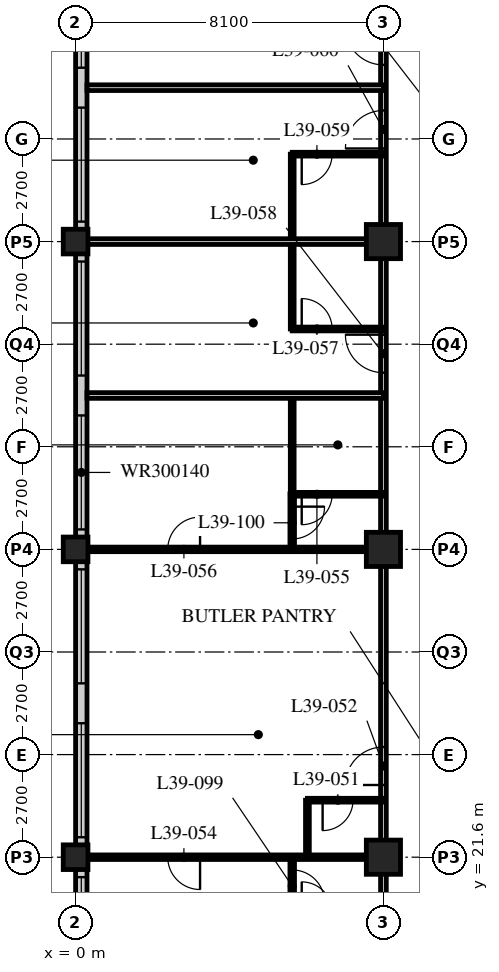
"""IFC4 building model, lengths in metres.
Left out: names, types, materials, properties, quantities, classifications, styles, units other than length and angle.
Written with IfcOpenShell. Run it as: python <this file> out.ifc"""

import sys

from ifc_helpers import new_model, si_unit, direction, frame, frame_2d, origin, origin_2d, place, context, subcontext, project, spatial, rectangle, hollow_rectangle, extrude, element, fill, save


model = new_model("IFC4")
c1 = context("Model", 3, precision=1e-05, world=origin(), true_north=direction((0.0, 1.0)))
c2 = subcontext(c1, "Body", "Model", "MODEL_VIEW")
j1 = project(units=[si_unit("LENGTHUNIT", "METRE"), si_unit("PLANEANGLEUNIT", "RADIAN")], contexts=[c1])
p1 = place(None, origin())
s1 = spatial("IfcSite", under=j1, at=p1, CompositionType="ELEMENT")
p2 = place(p1, origin())
s2 = spatial("IfcBuilding", under=s1, at=p2, CompositionType="ELEMENT")
p3 = place(p2, frame((0.0, 0.0, 151.0)))
s3 = spatial("IfcBuildingStorey", under=s2, at=p3, CompositionType="ELEMENT", Elevation=151.0)
for number, where, z_axis, x_axis in (
    (1, (0.0, 21.6, 0.0), (0.0, 0.0, 1.0), (1.0, 0.0, 0.0)),
    (2, (0.0, 29.7, 0.0), (0.0, 0.0, 1.0), (1.0, 0.0, 0.0)),
    (3, (0.0, 37.8, 0.0), (0.0, 0.0, 1.0), (1.0, 0.0, 0.0)),
):
    element("IfcColumn", number, at=place(p3, frame(where, z_axis=z_axis, x_axis=x_axis)), inside=s3, PredefinedType="COLUMN", context=c2, shape_type="SweptSolid", body=[
        extrude(hollow_rectangle(XDim=0.65, YDim=0.65, WallThickness=0.055, at=origin_2d()), origin(), (0.0, 0.0, 1.0), 3.4),
    ])
for number, where, z_axis, x_axis in (
    (4, (8.1, 21.6, 0.0), (0.0, 0.0, 1.0), (1.0, 0.0, 0.0)),
    (5, (8.1, 29.7, 0.0), (0.0, 0.0, 1.0), (1.0, 0.0, 0.0)),
    (6, (8.1, 37.8, 0.0), (0.0, 0.0, 1.0), (1.0, 0.0, 0.0)),
):
    element("IfcColumn", number, at=place(p3, frame(where, z_axis=z_axis, x_axis=x_axis)), inside=s3, PredefinedType="COLUMN", context=c2, shape_type="SweptSolid", body=[
        extrude(hollow_rectangle(XDim=0.9, YDim=0.9, WallThickness=0.1, at=origin_2d()), origin(), (0.0, 0.0, 1.0), 3.4),
    ])
p4 = place(p3, frame((0.15, 45.6, 0.0), z_axis=(0.0, 0.0, 1.0), x_axis=(0.0, -1.0, 0.0)))
e7 = element("IfcWall", 7, at=p4, inside=s3, PredefinedType="SOLIDWALL", context=c2, shape_type="SweptSolid", body=[
    extrude(rectangle(XDim=32.1, YDim=0.3, at=frame_2d((16.05, 0.0))), origin(), (0.0, 0.0, 1.0), 3.19),
])
p5 = place(p4, frame((0.225, 0.0, 0.9)))
e8 = element("IfcOpeningElement", 8, at=p5, cuts=e7, PredefinedType="OPENING", context=c2, shape_type="SweptSolid", body=[
    extrude(rectangle(XDim=3.0, YDim=1.4, at=frame_2d((1.5, 0.7))), frame((0.0, 0.16, 0.0), z_axis=(0.0, -1.0, 0.0), x_axis=(1.0, 0.0, 0.0)), (0.0, 0.0, 1.0), 0.32),
])
p6 = place(p4, frame((4.275, 0.0, 0.9)))
e9 = element("IfcOpeningElement", 9, at=p6, cuts=e7, PredefinedType="OPENING", context=c2, shape_type="SweptSolid", body=[
    extrude(rectangle(XDim=3.0, YDim=1.4, at=frame_2d((1.5, 0.7))), frame((0.0, 0.16, 0.0), z_axis=(0.0, -1.0, 0.0), x_axis=(1.0, 0.0, 0.0)), (0.0, 0.0, 1.0), 0.32),
])
p7 = place(p4, frame((8.325, 0.0, 0.9)))
e10 = element("IfcOpeningElement", 10, at=p7, cuts=e7, PredefinedType="OPENING", context=c2, shape_type="SweptSolid", body=[
    extrude(rectangle(XDim=3.0, YDim=1.4, at=frame_2d((1.5, 0.7))), frame((0.0, 0.16, 0.0), z_axis=(0.0, -1.0, 0.0), x_axis=(1.0, 0.0, 0.0)), (0.0, 0.0, 1.0), 0.32),
])
p8 = place(p4, frame((12.375, 0.0, 0.9)))
e11 = element("IfcOpeningElement", 11, at=p8, cuts=e7, PredefinedType="OPENING", context=c2, shape_type="SweptSolid", body=[
    extrude(rectangle(XDim=3.0, YDim=1.4, at=frame_2d((1.5, 0.7))), frame((0.0, 0.16, 0.0), z_axis=(0.0, -1.0, 0.0), x_axis=(1.0, 0.0, 0.0)), (0.0, 0.0, 1.0), 0.32),
])
p9 = place(p4, frame((16.425, 0.0, 0.9)))
e12 = element("IfcOpeningElement", 12, at=p9, cuts=e7, PredefinedType="OPENING", context=c2, shape_type="SweptSolid", body=[
    extrude(rectangle(XDim=3.0, YDim=1.4, at=frame_2d((1.5, 0.7))), frame((0.0, 0.16, 0.0), z_axis=(0.0, -1.0, 0.0), x_axis=(1.0, 0.0, 0.0)), (0.0, 0.0, 1.0), 0.32),
])
p10 = place(p4, frame((20.475, 0.0, 0.9)))
e13 = element("IfcOpeningElement", 13, at=p10, cuts=e7, PredefinedType="OPENING", context=c2, shape_type="SweptSolid", body=[
    extrude(rectangle(XDim=3.0, YDim=1.4, at=frame_2d((1.5, 0.7))), frame((0.0, 0.16, 0.0), z_axis=(0.0, -1.0, 0.0), x_axis=(1.0, 0.0, 0.0)), (0.0, 0.0, 1.0), 0.32),
])
p11 = place(p4, frame((24.525, 0.0, 0.9)))
e14 = element("IfcOpeningElement", 14, at=p11, cuts=e7, PredefinedType="OPENING", context=c2, shape_type="SweptSolid", body=[
    extrude(rectangle(XDim=3.0, YDim=1.4, at=frame_2d((1.5, 0.7))), frame((0.0, 0.16, 0.0), z_axis=(0.0, -1.0, 0.0), x_axis=(1.0, 0.0, 0.0)), (0.0, 0.0, 1.0), 0.32),
])
p12 = place(p4, frame((28.575, 0.0, 0.9)))
e15 = element("IfcOpeningElement", 15, at=p12, cuts=e7, PredefinedType="OPENING", context=c2, shape_type="SweptSolid", body=[
    extrude(rectangle(XDim=3.0, YDim=1.4, at=frame_2d((1.5, 0.7))), frame((0.0, 0.16, 0.0), z_axis=(0.0, -1.0, 0.0), x_axis=(1.0, 0.0, 0.0)), (0.0, 0.0, 1.0), 0.32),
])
p13 = place(p3, frame((8.1, 17.55, 0.0), z_axis=(0.0, 0.0, 1.0), x_axis=(0.0, 1.0, 0.0)))
e16 = element("IfcWall", 16, at=p13, inside=s3, PredefinedType="PARTITIONING", context=c2, shape_type="SweptSolid", body=[
    extrude(rectangle(XDim=28.35, YDim=0.15, at=frame_2d((14.175, 0.0))), origin(), (0.0, 0.0, 1.0), 2.42),
])
p14 = place(p13, frame((5.95, 0.0, 0.0)))
e17 = element("IfcOpeningElement", 17, at=p14, cuts=e16, PredefinedType="OPENING", context=c2, shape_type="SweptSolid", body=[
    extrude(rectangle(XDim=1.0, YDim=2.1, at=frame_2d((0.5, 1.05))), frame((0.0, 0.085, 0.0), z_axis=(0.0, -1.0, 0.0), x_axis=(1.0, 0.0, 0.0)), (0.0, 0.0, 1.0), 0.17),
])
p15 = place(p13, frame((16.8, 0.0, 0.0)))
e18 = element("IfcOpeningElement", 18, at=p15, cuts=e16, PredefinedType="OPENING", context=c2, shape_type="SweptSolid", body=[
    extrude(rectangle(XDim=1.0, YDim=2.1, at=frame_2d((0.5, 1.05))), frame((0.0, 0.085, 0.0), z_axis=(0.0, -1.0, 0.0), x_axis=(1.0, 0.0, 0.0)), (0.0, 0.0, 1.0), 0.17),
])
p16 = place(p13, frame((22.7, 0.0, 0.0)))
e19 = element("IfcOpeningElement", 19, at=p16, cuts=e16, PredefinedType="OPENING", context=c2, shape_type="SweptSolid", body=[
    extrude(rectangle(XDim=1.0, YDim=2.1, at=frame_2d((0.5, 1.05))), frame((0.0, 0.085, 0.0), z_axis=(0.0, -1.0, 0.0), x_axis=(1.0, 0.0, 0.0)), (0.0, 0.0, 1.0), 0.17),
])
p17 = place(p13, frame((24.9, 0.0, 0.0)))
e20 = element("IfcOpeningElement", 20, at=p17, cuts=e16, PredefinedType="OPENING", context=c2, shape_type="SweptSolid", body=[
    extrude(rectangle(XDim=1.0, YDim=2.1, at=frame_2d((0.5, 1.05))), frame((0.0, 0.085, 0.0), z_axis=(0.0, -1.0, 0.0), x_axis=(1.0, 0.0, 0.0)), (0.0, 0.0, 1.0), 0.17),
])
p18 = place(p3, frame((6.1, 21.6, 0.0), z_axis=(0.0, 0.0, 1.0), x_axis=(0.0, 1.0, 0.0)))
e21 = element("IfcWall", 21, at=p18, inside=s3, PredefinedType="PARTITIONING", context=c2, shape_type="SweptSolid", body=[
    extrude(rectangle(XDim=1.5, YDim=0.1, at=frame_2d((0.75, 0.0))), origin(), (0.0, 0.0, 1.0), 3.19),
])
p19 = place(p3, frame((8.1, 23.1, 0.0), z_axis=(0.0, 0.0, 1.0), x_axis=(-1.0, 0.0, 0.0)))
e22 = element("IfcWall", 22, at=p19, inside=s3, PredefinedType="PARTITIONING", context=c2, shape_type="SweptSolid", body=[
    extrude(rectangle(XDim=2.0, YDim=0.1, at=frame_2d((1.0, 0.0))), origin(), (0.0, 0.0, 1.0), 3.19),
])
p20 = place(p19, frame((0.8, 0.0, 0.0)))
e23 = element("IfcOpeningElement", 23, at=p20, cuts=e22, PredefinedType="OPENING", context=c2, shape_type="SweptSolid", body=[
    extrude(rectangle(XDim=0.8, YDim=2.1, at=frame_2d((0.4, 1.05))), frame((0.0, 0.06, 0.0), z_axis=(0.0, -1.0, 0.0), x_axis=(1.0, 0.0, 0.0)), (0.0, 0.0, 1.0), 0.12),
])
p21 = place(p3, frame((8.1, 21.6, 0.0), z_axis=(0.0, 0.0, 1.0), x_axis=(-1.0, 0.0, 0.0)))
e24 = element("IfcWall", 24, at=p21, inside=s3, PredefinedType="PARTITIONING", context=c2, shape_type="SweptSolid", body=[
    extrude(rectangle(XDim=7.8, YDim=0.12, at=frame_2d((3.9, 0.0))), origin(), (0.0, 0.0, 1.0), 2.42),
])
p22 = place(p21, frame((4.825, 0.0, 0.0)))
e25 = element("IfcOpeningElement", 25, at=p22, cuts=e24, PredefinedType="OPENING", context=c2, shape_type="SweptSolid", body=[
    extrude(rectangle(XDim=0.85, YDim=2.1, at=frame_2d((0.425, 1.05))), frame((0.0, 0.07, 0.0), z_axis=(0.0, -1.0, 0.0), x_axis=(1.0, 0.0, 0.0)), (0.0, 0.0, 1.0), 0.14),
])
p23 = place(p3, frame((5.7, 31.15, 0.0), z_axis=(0.0, 0.0, 1.0), x_axis=(0.0, 1.0, 0.0)))
e26 = element("IfcWall", 26, at=p23, inside=s3, PredefinedType="PARTITIONING", context=c2, shape_type="SweptSolid", body=[
    extrude(rectangle(XDim=2.6, YDim=0.1, at=frame_2d((1.3, 0.0))), origin(), (0.0, 0.0, 1.0), 3.19),
])
p24 = place(p3, frame((8.1, 31.15, 0.0), z_axis=(0.0, 0.0, 1.0), x_axis=(-1.0, 0.0, 0.0)))
e27 = element("IfcWall", 27, at=p24, inside=s3, PredefinedType="PARTITIONING", context=c2, shape_type="SweptSolid", body=[
    extrude(rectangle(XDim=2.4, YDim=0.1, at=frame_2d((1.2, 0.0))), origin(), (0.0, 0.0, 1.0), 3.19),
])
p25 = place(p24, frame((1.35, 0.0, 0.0)))
e28 = element("IfcOpeningElement", 28, at=p25, cuts=e27, PredefinedType="OPENING", context=c2, shape_type="SweptSolid", body=[
    extrude(rectangle(XDim=0.8, YDim=2.1, at=frame_2d((0.4, 1.05))), frame((0.0, 0.06, 0.0), z_axis=(0.0, -1.0, 0.0), x_axis=(1.0, 0.0, 0.0)), (0.0, 0.0, 1.0), 0.12),
])
p26 = place(p3, frame((8.1, 29.7, 0.0), z_axis=(0.0, 0.0, 1.0), x_axis=(-1.0, 0.0, 0.0)))
e29 = element("IfcWall", 29, at=p26, inside=s3, PredefinedType="PARTITIONING", context=c2, shape_type="SweptSolid", body=[
    extrude(rectangle(XDim=7.8, YDim=0.12, at=frame_2d((3.9, 0.0))), origin(), (0.0, 0.0, 1.0), 2.42),
])
p27 = place(p26, frame((4.825, 0.0, 0.0)))
e30 = element("IfcOpeningElement", 30, at=p27, cuts=e29, PredefinedType="OPENING", context=c2, shape_type="SweptSolid", body=[
    extrude(rectangle(XDim=0.85, YDim=2.1, at=frame_2d((0.425, 1.05))), frame((0.0, 0.07, 0.0), z_axis=(0.0, -1.0, 0.0), x_axis=(1.0, 0.0, 0.0)), (0.0, 0.0, 1.0), 0.14),
])
p28 = place(p3, frame((8.1, 33.75, 0.0), z_axis=(0.0, 0.0, 1.0), x_axis=(-1.0, 0.0, 0.0)))
e31 = element("IfcWall", 31, at=p28, inside=s3, PredefinedType="PARTITIONING", context=c2, shape_type="SweptSolid", body=[
    extrude(rectangle(XDim=7.8, YDim=0.15, at=frame_2d((3.9, 0.0))), origin(), (0.0, 0.0, 1.0), 3.19),
])
p29 = place(p3, frame((5.7, 35.5, 0.0), z_axis=(0.0, 0.0, 1.0), x_axis=(0.0, 1.0, 0.0)))
e32 = element("IfcWall", 32, at=p29, inside=s3, PredefinedType="PARTITIONING", context=c2, shape_type="SweptSolid", body=[
    extrude(rectangle(XDim=4.6, YDim=0.1, at=frame_2d((2.3, 0.0))), origin(), (0.0, 0.0, 1.0), 3.19),
])
p30 = place(p3, frame((8.1, 35.5, 0.0), z_axis=(0.0, 0.0, 1.0), x_axis=(-1.0, 0.0, 0.0)))
e33 = element("IfcWall", 33, at=p30, inside=s3, PredefinedType="PARTITIONING", context=c2, shape_type="SweptSolid", body=[
    extrude(rectangle(XDim=2.4, YDim=0.1, at=frame_2d((1.2, 0.0))), origin(), (0.0, 0.0, 1.0), 3.19),
])
p31 = place(p30, frame((1.35, 0.0, 0.0)))
e34 = element("IfcOpeningElement", 34, at=p31, cuts=e33, PredefinedType="OPENING", context=c2, shape_type="SweptSolid", body=[
    extrude(rectangle(XDim=0.8, YDim=2.1, at=frame_2d((0.4, 1.05))), frame((0.0, 0.06, 0.0), z_axis=(0.0, -1.0, 0.0), x_axis=(1.0, 0.0, 0.0)), (0.0, 0.0, 1.0), 0.12),
])
p32 = place(p3, frame((8.1, 37.8, 0.0), z_axis=(0.0, 0.0, 1.0), x_axis=(-1.0, 0.0, 0.0)))
e35 = element("IfcWall", 35, at=p32, inside=s3, PredefinedType="PARTITIONING", context=c2, shape_type="SweptSolid", body=[
    extrude(rectangle(XDim=7.8, YDim=0.15, at=frame_2d((3.9, 0.0))), origin(), (0.0, 0.0, 1.0), 2.42),
])
p33 = place(p3, frame((8.1, 40.1, 0.0), z_axis=(0.0, 0.0, 1.0), x_axis=(-1.0, 0.0, 0.0)))
e36 = element("IfcWall", 36, at=p33, inside=s3, PredefinedType="PARTITIONING", context=c2, shape_type="SweptSolid", body=[
    extrude(rectangle(XDim=2.4, YDim=0.1, at=frame_2d((1.2, 0.0))), origin(), (0.0, 0.0, 1.0), 3.19),
])
p34 = place(p33, frame((1.35, 0.0, 0.0)))
e37 = element("IfcOpeningElement", 37, at=p34, cuts=e36, PredefinedType="OPENING", context=c2, shape_type="SweptSolid", body=[
    extrude(rectangle(XDim=0.8, YDim=2.1, at=frame_2d((0.4, 1.05))), frame((0.0, 0.06, 0.0), z_axis=(0.0, -1.0, 0.0), x_axis=(1.0, 0.0, 0.0)), (0.0, 0.0, 1.0), 0.12),
])
p35 = place(p3, frame((8.1, 41.85, 0.0), z_axis=(0.0, 0.0, 1.0), x_axis=(-1.0, 0.0, 0.0)))
e38 = element("IfcWall", 38, at=p35, inside=s3, PredefinedType="PARTITIONING", context=c2, shape_type="SweptSolid", body=[
    extrude(rectangle(XDim=7.8, YDim=0.15, at=frame_2d((3.9, 0.0))), origin(), (0.0, 0.0, 1.0), 3.19),
])
p36 = place(p3, frame((5.7, 20.14, 0.0), z_axis=(0.0, 0.0, 1.0), x_axis=(0.0, 1.0, 0.0)))
e39 = element("IfcWall", 39, at=p36, inside=s3, PredefinedType="PARTITIONING", context=c2, shape_type="SweptSolid", body=[
    extrude(rectangle(XDim=1.46, YDim=0.12, at=frame_2d((0.73, 0.0))), origin(), (0.0, 0.0, 1.0), 3.19),
])
p37 = place(p36, frame((0.275, 0.0, 0.0)))
e40 = element("IfcOpeningElement", 40, at=p37, cuts=e39, PredefinedType="OPENING", context=c2, shape_type="SweptSolid", body=[
    extrude(rectangle(XDim=0.85, YDim=2.1, at=frame_2d((0.425, 1.05))), frame((0.0, 0.07, 0.0), z_axis=(0.0, -1.0, 0.0), x_axis=(1.0, 0.0, 0.0)), (0.0, 0.0, 1.0), 0.14),
])
p38 = place(p3, frame((5.7, 29.7, 0.0), z_axis=(0.0, 0.0, 1.0), x_axis=(0.0, 1.0, 0.0)))
e41 = element("IfcWall", 41, at=p38, inside=s3, PredefinedType="PARTITIONING", context=c2, shape_type="SweptSolid", body=[
    extrude(rectangle(XDim=1.46, YDim=0.12, at=frame_2d((0.73, 0.0))), origin(), (0.0, 0.0, 1.0), 3.19),
])
p39 = place(p38, frame((0.275, 0.0, 0.0)))
e42 = element("IfcOpeningElement", 42, at=p39, cuts=e41, PredefinedType="OPENING", context=c2, shape_type="SweptSolid", body=[
    extrude(rectangle(XDim=0.85, YDim=2.1, at=frame_2d((0.425, 1.05))), frame((0.0, 0.07, 0.0), z_axis=(0.0, -1.0, 0.0), x_axis=(1.0, 0.0, 0.0)), (0.0, 0.0, 1.0), 0.14),
])
p40 = place(p5, origin())
e43 = element("IfcWindow", 43, at=p40, inside=s3, PartitioningType="SINGLE_PANEL", PredefinedType="WINDOW", context=c2, shape_type="SweptSolid", body=[
    extrude(rectangle(XDim=3.0, YDim=1.4, at=frame_2d((1.5, 0.7))), frame((0.0, 0.03, 0.0), z_axis=(0.0, -1.0, 0.0), x_axis=(1.0, 0.0, 0.0)), (0.0, 0.0, 1.0), 0.06),
])
fill(e8, e43)
p41 = place(p6, origin())
e44 = element("IfcWindow", 44, at=p41, inside=s3, PartitioningType="SINGLE_PANEL", PredefinedType="WINDOW", context=c2, shape_type="SweptSolid", body=[
    extrude(rectangle(XDim=3.0, YDim=1.4, at=frame_2d((1.5, 0.7))), frame((0.0, 0.03, 0.0), z_axis=(0.0, -1.0, 0.0), x_axis=(1.0, 0.0, 0.0)), (0.0, 0.0, 1.0), 0.06),
])
fill(e9, e44)
p42 = place(p7, origin())
e45 = element("IfcWindow", 45, at=p42, inside=s3, PartitioningType="SINGLE_PANEL", PredefinedType="WINDOW", context=c2, shape_type="SweptSolid", body=[
    extrude(rectangle(XDim=3.0, YDim=1.4, at=frame_2d((1.5, 0.7))), frame((0.0, 0.03, 0.0), z_axis=(0.0, -1.0, 0.0), x_axis=(1.0, 0.0, 0.0)), (0.0, 0.0, 1.0), 0.06),
])
fill(e10, e45)
p43 = place(p8, origin())
e46 = element("IfcWindow", 46, at=p43, inside=s3, PartitioningType="SINGLE_PANEL", PredefinedType="WINDOW", context=c2, shape_type="SweptSolid", body=[
    extrude(rectangle(XDim=3.0, YDim=1.4, at=frame_2d((1.5, 0.7))), frame((0.0, 0.03, 0.0), z_axis=(0.0, -1.0, 0.0), x_axis=(1.0, 0.0, 0.0)), (0.0, 0.0, 1.0), 0.06),
])
fill(e11, e46)
p44 = place(p9, origin())
e47 = element("IfcWindow", 47, at=p44, inside=s3, PartitioningType="SINGLE_PANEL", PredefinedType="WINDOW", context=c2, shape_type="SweptSolid", body=[
    extrude(rectangle(XDim=3.0, YDim=1.4, at=frame_2d((1.5, 0.7))), frame((0.0, 0.03, 0.0), z_axis=(0.0, -1.0, 0.0), x_axis=(1.0, 0.0, 0.0)), (0.0, 0.0, 1.0), 0.06),
])
fill(e12, e47)
p45 = place(p10, origin())
e48 = element("IfcWindow", 48, at=p45, inside=s3, PartitioningType="SINGLE_PANEL", PredefinedType="WINDOW", context=c2, shape_type="SweptSolid", body=[
    extrude(rectangle(XDim=3.0, YDim=1.4, at=frame_2d((1.5, 0.7))), frame((0.0, 0.03, 0.0), z_axis=(0.0, -1.0, 0.0), x_axis=(1.0, 0.0, 0.0)), (0.0, 0.0, 1.0), 0.06),
])
fill(e13, e48)
p46 = place(p11, origin())
e49 = element("IfcWindow", 49, at=p46, inside=s3, PartitioningType="SINGLE_PANEL", PredefinedType="WINDOW", context=c2, shape_type="SweptSolid", body=[
    extrude(rectangle(XDim=3.0, YDim=1.4, at=frame_2d((1.5, 0.7))), frame((0.0, 0.03, 0.0), z_axis=(0.0, -1.0, 0.0), x_axis=(1.0, 0.0, 0.0)), (0.0, 0.0, 1.0), 0.06),
])
fill(e14, e49)
p47 = place(p20, origin())
e50 = element("IfcDoor", 50, at=p47, inside=s3, OperationType="SINGLE_SWING_RIGHT", PredefinedType="DOOR", context=c2, shape_type="SweptSolid", body=[
    extrude(rectangle(XDim=0.8, YDim=2.1, at=frame_2d((0.4, 1.05))), frame((0.0, 0.025, 0.0), z_axis=(0.0, -1.0, 0.0), x_axis=(1.0, 0.0, 0.0)), (0.0, 0.0, 1.0), 0.05),
])
fill(e23, e50)
p48 = place(p14, origin())
e51 = element("IfcDoor", 51, at=p48, inside=s3, OperationType="SINGLE_SWING_LEFT", PredefinedType="DOOR", context=c2, shape_type="SweptSolid", body=[
    extrude(rectangle(XDim=1.0, YDim=2.1, at=frame_2d((0.5, 1.05))), frame((0.0, 0.025, 0.0), z_axis=(0.0, -1.0, 0.0), x_axis=(1.0, 0.0, 0.0)), (0.0, 0.0, 1.0), 0.05),
])
fill(e17, e51)
p49 = place(p22, origin())
e52 = element("IfcDoor", 52, at=p49, inside=s3, OperationType="SINGLE_SWING_LEFT", PredefinedType="DOOR", context=c2, shape_type="SweptSolid", body=[
    extrude(rectangle(XDim=0.85, YDim=2.1, at=frame_2d((0.425, 1.05))), frame((0.0, 0.025, 0.0), z_axis=(0.0, -1.0, 0.0), x_axis=(1.0, 0.0, 0.0)), (0.0, 0.0, 1.0), 0.05),
])
fill(e25, e52)
p50 = place(p25, origin())
e53 = element("IfcDoor", 53, at=p50, inside=s3, OperationType="SINGLE_SWING_RIGHT", PredefinedType="DOOR", context=c2, shape_type="SweptSolid", body=[
    extrude(rectangle(XDim=0.8, YDim=2.1, at=frame_2d((0.4, 1.05))), frame((0.0, 0.025, 0.0), z_axis=(0.0, -1.0, 0.0), x_axis=(1.0, 0.0, 0.0)), (0.0, 0.0, 1.0), 0.05),
])
fill(e28, e53)
p51 = place(p27, origin())
e54 = element("IfcDoor", 54, at=p51, inside=s3, OperationType="SINGLE_SWING_RIGHT", PredefinedType="DOOR", context=c2, shape_type="SweptSolid", body=[
    extrude(rectangle(XDim=0.85, YDim=2.1, at=frame_2d((0.425, 1.05))), frame((0.0, 0.025, 0.0), z_axis=(0.0, -1.0, 0.0), x_axis=(1.0, 0.0, 0.0)), (0.0, 0.0, 1.0), 0.05),
])
fill(e30, e54)
p52 = place(p31, origin())
e55 = element("IfcDoor", 55, at=p52, inside=s3, OperationType="SINGLE_SWING_LEFT", PredefinedType="DOOR", context=c2, shape_type="SweptSolid", body=[
    extrude(rectangle(XDim=0.8, YDim=2.1, at=frame_2d((0.4, 1.05))), frame((0.0, 0.025, 0.0), z_axis=(0.0, -1.0, 0.0), x_axis=(1.0, 0.0, 0.0)), (0.0, 0.0, 1.0), 0.05),
])
fill(e34, e55)
p53 = place(p15, origin())
e56 = element("IfcDoor", 56, at=p53, inside=s3, OperationType="SINGLE_SWING_RIGHT", PredefinedType="DOOR", context=c2, shape_type="SweptSolid", body=[
    extrude(rectangle(XDim=1.0, YDim=2.1, at=frame_2d((0.5, 1.05))), frame((0.0, 0.025, 0.0), z_axis=(0.0, -1.0, 0.0), x_axis=(1.0, 0.0, 0.0)), (0.0, 0.0, 1.0), 0.05),
])
fill(e18, e56)
p54 = place(p34, origin())
e57 = element("IfcDoor", 57, at=p54, inside=s3, OperationType="SINGLE_SWING_RIGHT", PredefinedType="DOOR", context=c2, shape_type="SweptSolid", body=[
    extrude(rectangle(XDim=0.8, YDim=2.1, at=frame_2d((0.4, 1.05))), frame((0.0, 0.025, 0.0), z_axis=(0.0, -1.0, 0.0), x_axis=(1.0, 0.0, 0.0)), (0.0, 0.0, 1.0), 0.05),
])
fill(e37, e57)
p55 = place(p16, origin())
e58 = element("IfcDoor", 58, at=p55, inside=s3, OperationType="SINGLE_SWING_LEFT", PredefinedType="DOOR", context=c2, shape_type="SweptSolid", body=[
    extrude(rectangle(XDim=1.0, YDim=2.1, at=frame_2d((0.5, 1.05))), frame((0.0, 0.025, 0.0), z_axis=(0.0, -1.0, 0.0), x_axis=(1.0, 0.0, 0.0)), (0.0, 0.0, 1.0), 0.05),
])
fill(e19, e58)
p56 = place(p17, origin())
e59 = element("IfcDoor", 59, at=p56, inside=s3, OperationType="SINGLE_SWING_RIGHT", PredefinedType="DOOR", context=c2, shape_type="SweptSolid", body=[
    extrude(rectangle(XDim=1.0, YDim=2.1, at=frame_2d((0.5, 1.05))), frame((0.0, 0.025, 0.0), z_axis=(0.0, -1.0, 0.0), x_axis=(1.0, 0.0, 0.0)), (0.0, 0.0, 1.0), 0.05),
])
fill(e20, e59)
p57 = place(p37, origin())
e60 = element("IfcDoor", 60, at=p57, inside=s3, OperationType="SINGLE_SWING_RIGHT", PredefinedType="DOOR", context=c2, shape_type="SweptSolid", body=[
    extrude(rectangle(XDim=0.85, YDim=2.1, at=frame_2d((0.425, 1.05))), frame((0.0, 0.025, 0.0), z_axis=(0.0, -1.0, 0.0), x_axis=(1.0, 0.0, 0.0)), (0.0, 0.0, 1.0), 0.05),
])
fill(e40, e60)
p58 = place(p39, origin())
e61 = element("IfcDoor", 61, at=p58, inside=s3, OperationType="SINGLE_SWING_LEFT", PredefinedType="DOOR", context=c2, shape_type="SweptSolid", body=[
    extrude(rectangle(XDim=0.85, YDim=2.1, at=frame_2d((0.425, 1.05))), frame((0.0, 0.025, 0.0), z_axis=(0.0, -1.0, 0.0), x_axis=(1.0, 0.0, 0.0)), (0.0, 0.0, 1.0), 0.05),
])
fill(e42, e61)
save(model, sys.argv[1])
